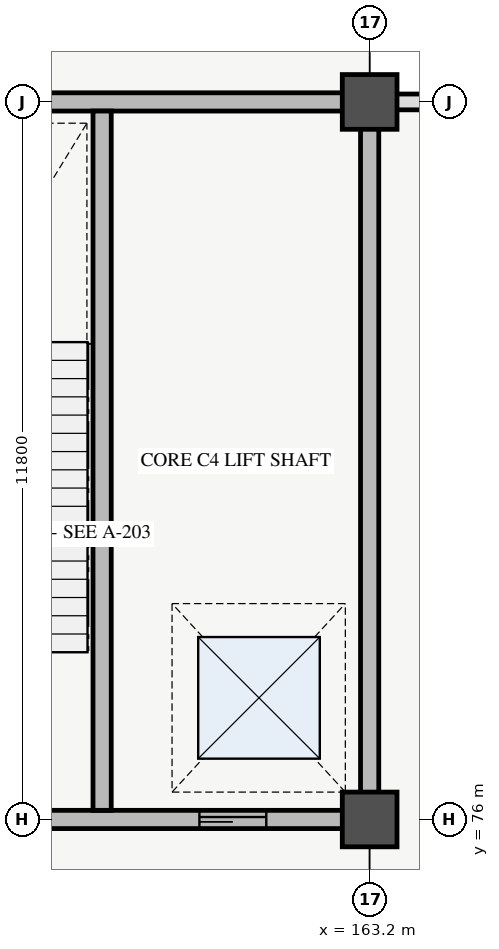
"""IFC4 building model, lengths in metres.
Left out: names, types, materials, properties, quantities, classifications, styles, units other than length and angle.
Written with IfcOpenShell. Run it as: python <this file> out.ifc"""

import sys

from ifc_helpers import new_model, si_unit, direction, frame, frame_2d, origin, origin_2d, place, context, subcontext, project, spatial, rectangle, extrude, element, fill, save


model = new_model("IFC4")
c1 = context("Model", 3, precision=1e-05, world=origin(), true_north=direction((0.0, 1.0)))
c2 = subcontext(c1, "Body", "Model", "MODEL_VIEW")
j1 = project(units=[si_unit("LENGTHUNIT", "METRE"), si_unit("PLANEANGLEUNIT", "RADIAN")], contexts=[c1])
p1 = place(None, origin())
s1 = spatial("IfcSite", under=j1, at=p1, CompositionType="ELEMENT")
p2 = place(p1, origin())
s2 = spatial("IfcBuilding", under=s1, at=p2, CompositionType="ELEMENT")
p3 = place(p2, origin())
s3 = spatial("IfcBuildingStorey", under=s2, at=p3, CompositionType="ELEMENT", Elevation=0.0)
for number, where, z_axis, x_axis in (
    (1, (163.2, 76.0, 0.0), (0.0, 0.0, 1.0), (1.0, 0.0, 0.0)),
    (2, (163.2, 87.8, 0.0), (0.0, 0.0, 1.0), (1.0, 0.0, 0.0)),
):
    element("IfcColumn", number, at=place(p3, frame(where, z_axis=z_axis, x_axis=x_axis)), inside=s3, PredefinedType="COLUMN", context=c2, shape_type="SweptSolid", body=[
        extrude(rectangle(XDim=0.9, YDim=0.9, at=origin_2d()), origin(), (0.0, 0.0, 1.0), 5.4),
    ])
p4 = place(p3, frame((153.0, 76.0, 0.0), z_axis=(0.0, 0.0, 1.0), x_axis=(1.0, 0.0, 0.0)))
e3 = element("IfcWall", 3, at=p4, inside=s3, PredefinedType="SHEAR", context=c2, shape_type="SweptSolid", body=[
    extrude(rectangle(XDim=10.2, YDim=0.3, at=frame_2d((5.1, 0.0))), origin(), (0.0, 0.0, 1.0), 5.4),
])
p5 = place(p4, frame((7.4, 0.0, 0.0)))
e4 = element("IfcOpeningElement", 4, at=p5, cuts=e3, PredefinedType="OPENING", context=c2, shape_type="SweptSolid", body=[
    extrude(rectangle(XDim=1.1, YDim=2.2, at=frame_2d((0.55, 1.1))), frame((0.0, 0.16, 0.0), z_axis=(0.0, -1.0, 0.0), x_axis=(1.0, 0.0, 0.0)), (0.0, 0.0, 1.0), 0.32),
])
p6 = place(p3, frame((153.0, 87.8, 0.0), z_axis=(0.0, 0.0, 1.0), x_axis=(1.0, 0.0, 0.0)))
e5 = element("IfcWall", 5, at=p6, inside=s3, PredefinedType="SHEAR", context=c2, shape_type="SweptSolid", body=[
    extrude(rectangle(XDim=10.2, YDim=0.3, at=frame_2d((5.1, 0.0))), origin(), (0.0, 0.0, 1.0), 5.4),
])
p7 = place(p3, frame((163.2, 76.0, 0.0), z_axis=(0.0, 0.0, 1.0), x_axis=(0.0, 1.0, 0.0)))
e6 = element("IfcWall", 6, at=p7, inside=s3, PredefinedType="SHEAR", context=c2, shape_type="SweptSolid", body=[
    extrude(rectangle(XDim=11.8, YDim=0.3, at=frame_2d((5.9, 0.0))), origin(), (0.0, 0.0, 1.0), 5.4),
])
p8 = place(p3, frame((163.44, 87.8, 0.0), z_axis=(0.0, 0.0, 1.0), x_axis=(1.0, 0.0, 0.0)))
e7 = element("IfcWall", 7, at=p8, inside=s3, PredefinedType="STANDARD", context=c2, shape_type="SweptSolid", body=[
    extrude(rectangle(XDim=9.72, YDim=0.26, at=frame_2d((4.86, 0.0))), origin(), (0.0, 0.0, 1.0), 3.68),
])
p9 = place(p8, frame((3.56, 0.0, 0.0)))
e8 = element("IfcOpeningElement", 8, at=p9, cuts=e7, PredefinedType="OPENING", context=c2, shape_type="SweptSolid", body=[
    extrude(rectangle(XDim=2.6, YDim=2.4, at=frame_2d((1.3, 1.2))), frame((0.0, 0.14, 0.0), z_axis=(0.0, -1.0, 0.0), x_axis=(1.0, 0.0, 0.0)), (0.0, 0.0, 1.0), 0.28),
])
p10 = place(p3, frame((158.8, 76.15, 0.0), z_axis=(0.0, 0.0, 1.0), x_axis=(0.0, 1.0, 0.0)))
e9 = element("IfcWall", 9, at=p10, inside=s3, PredefinedType="SHEAR", context=c2, shape_type="SweptSolid", body=[
    extrude(rectangle(XDim=11.5, YDim=0.3, at=frame_2d((5.75, 0.0))), origin(), (0.0, 0.0, 1.0), 5.4),
])
p11 = place(p5, origin())
e10 = element("IfcDoor", 10, at=p11, inside=s3, OperationType="SLIDING_TO_RIGHT", PredefinedType="DOOR", context=c2, shape_type="SweptSolid", body=[
    extrude(rectangle(XDim=1.1, YDim=2.2, at=frame_2d((0.55, 1.1))), frame((0.0, 0.025, 0.0), z_axis=(0.0, -1.0, 0.0), x_axis=(1.0, 0.0, 0.0)), (0.0, 0.0, 1.0), 0.05),
])
fill(e4, e10)
save(model, sys.argv[1])
